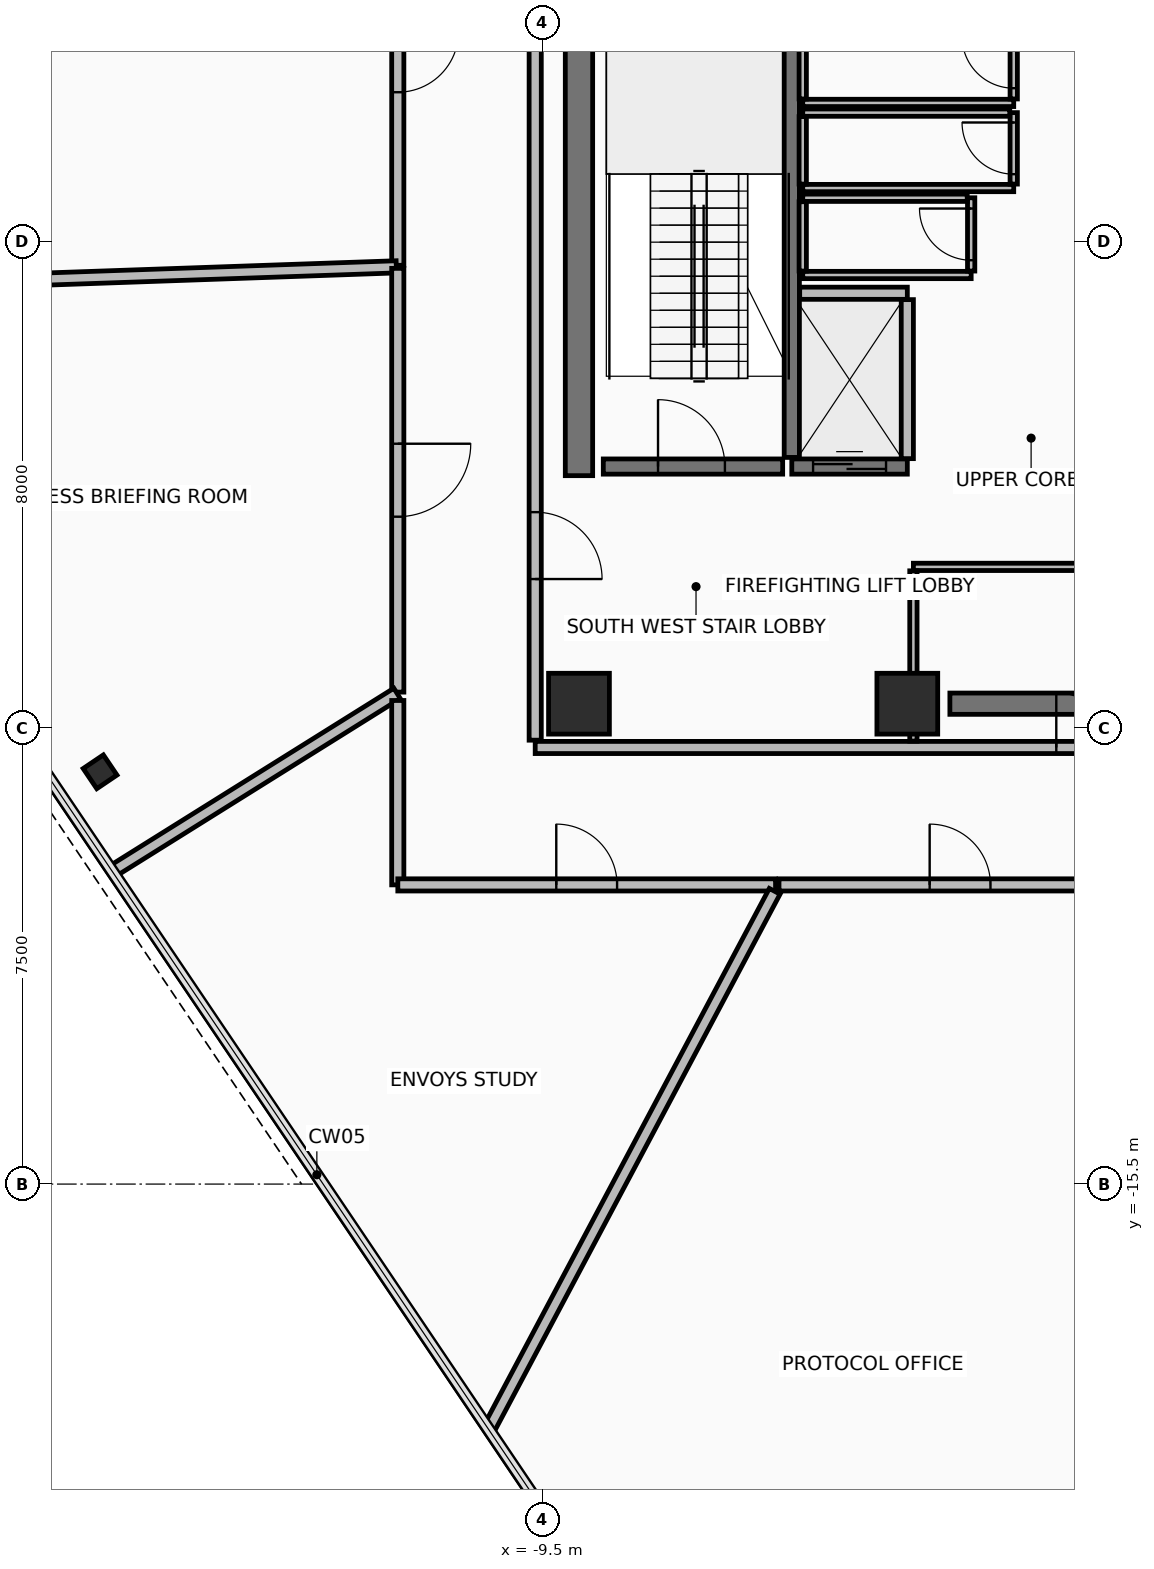
"""IFC4 building model, lengths in metres.
Left out: names, types, materials, properties, quantities, classifications, styles, units other than length and angle.
Written with IfcOpenShell. Run it as: python <this file> out.ifc"""

import sys

from ifc_helpers import new_model, si_unit, direction, frame, frame_2d, origin, origin_2d, place, context, subcontext, project, spatial, rectangle, hollow_rectangle, extrude, element, fill, save


model = new_model("IFC4")
c1 = context("Model", 3, precision=1e-05, world=origin(), true_north=direction((0.0, 1.0)))
c2 = subcontext(c1, "Body", "Model", "MODEL_VIEW")
j1 = project(units=[si_unit("LENGTHUNIT", "METRE"), si_unit("PLANEANGLEUNIT", "RADIAN")], contexts=[c1])
p1 = place(None, origin())
s1 = spatial("IfcSite", under=j1, at=p1, CompositionType="ELEMENT")
p2 = place(p1, origin())
s2 = spatial("IfcBuilding", under=s1, at=p2, CompositionType="ELEMENT")
p3 = place(p2, frame((0.0, 0.0, 275.0)))
s3 = spatial("IfcBuildingStorey", under=s2, at=p3, CompositionType="ELEMENT", Elevation=275.0)
for number, where, z_axis, x_axis in (
    (1, (-8.9, -7.6, 0.0), (0.0, 0.0, 1.0), (1.0, 0.0, 0.0)),
    (2, (-3.5, -7.6, 0.0), (0.0, 0.0, 1.0), (1.0, 0.0, 0.0)),
):
    element("IfcColumn", number, at=place(p3, frame(where, z_axis=z_axis, x_axis=x_axis)), inside=s3, PredefinedType="COLUMN", context=c2, shape_type="SweptSolid", body=[
        extrude(rectangle(XDim=1.0, YDim=1.0, at=origin_2d()), origin(), (0.0, 0.0, 1.0), 4.75),
    ])
p4 = place(p3, frame((-16.776, -8.72, 0.0), z_axis=(0.0, 0.0, 1.0), x_axis=(-0.559192903471, 0.829037572555, 0.0)))
e3 = element("IfcColumn", 3, at=p4, inside=s3, PredefinedType="COLUMN", context=c2, shape_type="SweptSolid", body=[
    extrude(hollow_rectangle(XDim=0.4, YDim=0.4, WallThickness=0.025, at=origin_2d()), origin(), (0.0, 0.0, 1.0), 4.75),
])
p5 = place(p3, frame((-2.8, -7.6, 0.0), z_axis=(0.0, 0.0, 1.0), x_axis=(1.0, 0.0, 0.0)))
e4 = element("IfcWall", 4, at=p5, inside=s3, PredefinedType="SHEAR", context=c2, shape_type="SweptSolid", body=[
    extrude(rectangle(XDim=5.38, YDim=0.35, at=frame_2d((2.69, 0.0))), origin(), (0.0, 0.0, 1.0), 4.56),
])
p6 = place(p3, frame((-8.9, -3.85, 0.0), z_axis=(0.0, 0.0, 1.0), x_axis=(0.0, 1.0, 0.0)))
e5 = element("IfcWall", 5, at=p6, inside=s3, PredefinedType="SHEAR", context=c2, shape_type="SweptSolid", body=[
    extrude(rectangle(XDim=10.7, YDim=0.45, at=frame_2d((5.35, 0.0))), origin(), (0.0, 0.0, 1.0), 4.56),
])
p7 = place(p3, frame((-9.62, -8.32, 0.0), z_axis=(0.0, 0.0, 1.0), x_axis=(1.0, 0.0, 0.0)))
e6 = element("IfcWall", 6, at=p7, inside=s3, PredefinedType="PARTITIONING", context=c2, shape_type="SweptSolid", body=[
    extrude(rectangle(XDim=19.24, YDim=0.2, at=frame_2d((9.62, 0.0))), origin(), (0.0, 0.0, 1.0), 2.355),
])
p8 = place(p7, frame((8.57, 0.0, 0.0)))
e7 = element("IfcOpeningElement", 7, at=p8, cuts=e6, PredefinedType="OPENING", context=c2, shape_type="SweptSolid", body=[
    extrude(rectangle(XDim=0.9, YDim=2.1, at=frame_2d((0.45, 1.05))), frame((0.0, 0.11, 0.0), z_axis=(0.0, -1.0, 0.0), x_axis=(1.0, 0.0, 0.0)), (0.0, 0.0, 1.0), 0.22),
])
p9 = place(p7, frame((15.02, 0.0, 0.0)))
e8 = element("IfcOpeningElement", 8, at=p9, cuts=e6, PredefinedType="OPENING", context=c2, shape_type="SweptSolid", body=[
    extrude(rectangle(XDim=0.9, YDim=2.1, at=frame_2d((0.45, 1.05))), frame((0.0, 0.11, 0.0), z_axis=(0.0, -1.0, 0.0), x_axis=(1.0, 0.0, 0.0)), (0.0, 0.0, 1.0), 0.22),
])
p10 = place(p3, frame((-9.62, 8.2, 0.0), z_axis=(0.0, 0.0, 1.0), x_axis=(0.0, -1.0, 0.0)))
e9 = element("IfcWall", 9, at=p10, inside=s3, PredefinedType="PARTITIONING", context=c2, shape_type="SweptSolid", body=[
    extrude(rectangle(XDim=16.4, YDim=0.2, at=frame_2d((8.2, 0.0))), origin(), (0.0, 0.0, 1.0), 2.355),
])
p11 = place(p10, frame((12.65, 0.0, 0.0)))
e10 = element("IfcOpeningElement", 10, at=p11, cuts=e9, PredefinedType="OPENING", context=c2, shape_type="SweptSolid", body=[
    extrude(rectangle(XDim=1.1, YDim=2.15, at=frame_2d((0.55, 1.075))), frame((0.0, 0.11, 0.0), z_axis=(0.0, -1.0, 0.0), x_axis=(1.0, 0.0, 0.0)), (0.0, 0.0, 1.0), 0.22),
])
p12 = place(p3, frame((-5.4, -3.55, 0.0), z_axis=(0.0, 0.0, 1.0), x_axis=(0.0, 1.0, 0.0)))
e11 = element("IfcWall", 11, at=p12, inside=s3, PredefinedType="SHEAR", context=c2, shape_type="SweptSolid", body=[
    extrude(rectangle(XDim=7.3, YDim=0.25, at=frame_2d((3.65, 0.0))), origin(), (0.0, 0.0, 1.0), 4.56),
])
p13 = place(p3, frame((-8.5, -3.7, 0.0), z_axis=(0.0, 0.0, 1.0), x_axis=(1.0, 0.0, 0.0)))
e12 = element("IfcWall", 12, at=p13, inside=s3, PredefinedType="SHEAR", context=c2, shape_type="SweptSolid", body=[
    extrude(rectangle(XDim=2.95, YDim=0.25, at=frame_2d((1.475, 0.0))), origin(), (0.0, 0.0, 1.0), 4.56),
])
p14 = place(p13, frame((0.9, 0.0, 0.0)))
e13 = element("IfcOpeningElement", 13, at=p14, cuts=e12, PredefinedType="OPENING", context=c2, shape_type="SweptSolid", body=[
    extrude(rectangle(XDim=1.1, YDim=2.15, at=frame_2d((0.55, 1.075))), frame((0.0, 0.135, 0.0), z_axis=(0.0, -1.0, 0.0), x_axis=(1.0, 0.0, 0.0)), (0.0, 0.0, 1.0), 0.27),
])
p15 = place(p3, frame((-5.4, -3.7, 0.0), z_axis=(0.0, 0.0, 1.0), x_axis=(1.0, 0.0, 0.0)))
e14 = element("IfcWall", 14, at=p15, inside=s3, PredefinedType="SHEAR", context=c2, shape_type="SweptSolid", body=[
    extrude(rectangle(XDim=1.9, YDim=0.25, at=frame_2d((0.95, 0.0))), origin(), (0.0, 0.0, 1.0), 4.56),
])
p16 = place(p15, frame((0.35, 0.0, 0.0)))
e15 = element("IfcOpeningElement", 15, at=p16, cuts=e14, PredefinedType="OPENING", context=c2, shape_type="SweptSolid", body=[
    extrude(rectangle(XDim=1.2, YDim=2.2, at=frame_2d((0.6, 1.1))), frame((0.0, 0.135, 0.0), z_axis=(0.0, -1.0, 0.0), x_axis=(1.0, 0.0, 0.0)), (0.0, 0.0, 1.0), 0.27),
])
p17 = place(p3, frame((-5.27, -0.85, 0.0), z_axis=(0.0, 0.0, 1.0), x_axis=(1.0, 0.0, 0.0)))
e16 = element("IfcWall", 16, at=p17, inside=s3, PredefinedType="PARTITIONING", context=c2, shape_type="SweptSolid", body=[
    extrude(rectangle(XDim=1.77, YDim=0.2, at=frame_2d((0.885, 0.0))), origin(), (0.0, 0.0, 1.0), 4.56),
])
p18 = place(p3, frame((-3.5, -3.57, 0.0), z_axis=(0.0, 0.0, 1.0), x_axis=(0.0, 1.0, 0.0)))
e17 = element("IfcWall", 17, at=p18, inside=s3, PredefinedType="PARTITIONING", context=c2, shape_type="SweptSolid", body=[
    extrude(rectangle(XDim=2.615, YDim=0.2, at=frame_2d((1.308, 0.0))), origin(), (0.0, 0.0, 1.0), 4.56),
])
p19 = place(p3, frame((-5.22, 2.28, 0.0), z_axis=(0.0, 0.0, 1.0), x_axis=(1.0, 0.0, 0.0)))
e18 = element("IfcWall", 18, at=p19, inside=s3, PredefinedType="PARTITIONING", context=c2, shape_type="SweptSolid", body=[
    extrude(rectangle(XDim=3.47, YDim=0.12, at=frame_2d((1.735, 0.0))), origin(), (0.0, 0.0, 1.0), 4.56),
])
p20 = place(p3, frame((-1.75, 2.345, 0.0), z_axis=(0.0, 0.0, 1.0), x_axis=(0.0, 1.0, 0.0)))
e19 = element("IfcWall", 19, at=p20, inside=s3, PredefinedType="PARTITIONING", context=c2, shape_type="SweptSolid", body=[
    extrude(rectangle(XDim=1.205, YDim=0.12, at=frame_2d((0.603, 0.0))), origin(), (0.0, 0.0, 1.0), 4.56),
])
p21 = place(p20, frame((0.177, 0.0, 0.0)))
e20 = element("IfcOpeningElement", 20, at=p21, cuts=e19, PredefinedType="OPENING", context=c2, shape_type="SweptSolid", body=[
    extrude(rectangle(XDim=0.85, YDim=2.1, at=frame_2d((0.425, 1.05))), frame((0.0, 0.07, 0.0), z_axis=(0.0, -1.0, 0.0), x_axis=(1.0, 0.0, 0.0)), (0.0, 0.0, 1.0), 0.14),
])
p22 = place(p3, frame((-5.22, 3.485, 0.0), z_axis=(0.0, 0.0, 1.0), x_axis=(0.0, -1.0, 0.0)))
e21 = element("IfcWall", 21, at=p22, inside=s3, PredefinedType="PARTITIONING", context=c2, shape_type="SweptSolid", body=[
    extrude(rectangle(XDim=1.14, YDim=0.12, at=frame_2d((0.57, 0.0))), origin(), (0.0, 0.0, 1.0), 4.56),
])
p23 = place(p3, frame((-5.22, 0.88, 0.0), z_axis=(0.0, 0.0, 1.0), x_axis=(1.0, 0.0, 0.0)))
e22 = element("IfcWall", 22, at=p23, inside=s3, PredefinedType="PARTITIONING", context=c2, shape_type="SweptSolid", body=[
    extrude(rectangle(XDim=3.47, YDim=0.12, at=frame_2d((1.735, 0.0))), origin(), (0.0, 0.0, 1.0), 4.56),
])
p24 = place(p3, frame((-1.75, 0.945, 0.0), z_axis=(0.0, 0.0, 1.0), x_axis=(0.0, 1.0, 0.0)))
e23 = element("IfcWall", 23, at=p24, inside=s3, PredefinedType="PARTITIONING", context=c2, shape_type="SweptSolid", body=[
    extrude(rectangle(XDim=1.175, YDim=0.12, at=frame_2d((0.587, 0.0))), origin(), (0.0, 0.0, 1.0), 4.56),
])
p25 = place(p24, frame((0.163, 0.0, 0.0)))
e24 = element("IfcOpeningElement", 24, at=p25, cuts=e23, PredefinedType="OPENING", context=c2, shape_type="SweptSolid", body=[
    extrude(rectangle(XDim=0.85, YDim=2.1, at=frame_2d((0.425, 1.05))), frame((0.0, 0.07, 0.0), z_axis=(0.0, -1.0, 0.0), x_axis=(1.0, 0.0, 0.0)), (0.0, 0.0, 1.0), 0.14),
])
p26 = place(p3, frame((-1.815, 2.12, 0.0), z_axis=(0.0, 0.0, 1.0), x_axis=(-1.0, 0.0, 0.0)))
e25 = element("IfcWall", 25, at=p26, inside=s3, PredefinedType="PARTITIONING", context=c2, shape_type="SweptSolid", body=[
    extrude(rectangle(XDim=3.405, YDim=0.12, at=frame_2d((1.703, 0.0))), origin(), (0.0, 0.0, 1.0), 4.56),
])
p27 = place(p3, frame((-5.22, 2.055, 0.0), z_axis=(0.0, 0.0, 1.0), x_axis=(0.0, -1.0, 0.0)))
e26 = element("IfcWall", 26, at=p27, inside=s3, PredefinedType="PARTITIONING", context=c2, shape_type="SweptSolid", body=[
    extrude(rectangle(XDim=1.11, YDim=0.12, at=frame_2d((0.555, 0.0))), origin(), (0.0, 0.0, 1.0), 4.56),
])
p28 = place(p3, frame((-5.22, -0.55, 0.0), z_axis=(0.0, 0.0, 1.0), x_axis=(1.0, 0.0, 0.0)))
e27 = element("IfcWall", 27, at=p28, inside=s3, PredefinedType="PARTITIONING", context=c2, shape_type="SweptSolid", body=[
    extrude(rectangle(XDim=2.77, YDim=0.12, at=frame_2d((1.385, 0.0))), origin(), (0.0, 0.0, 1.0), 4.56),
])
p29 = place(p3, frame((-2.45, -0.485, 0.0), z_axis=(0.0, 0.0, 1.0), x_axis=(0.0, 1.0, 0.0)))
e28 = element("IfcWall", 28, at=p29, inside=s3, PredefinedType="PARTITIONING", context=c2, shape_type="SweptSolid", body=[
    extrude(rectangle(XDim=1.205, YDim=0.12, at=frame_2d((0.603, 0.0))), origin(), (0.0, 0.0, 1.0), 4.56),
])
p30 = place(p29, frame((0.178, 0.0, 0.0)))
e29 = element("IfcOpeningElement", 29, at=p30, cuts=e28, PredefinedType="OPENING", context=c2, shape_type="SweptSolid", body=[
    extrude(rectangle(XDim=0.85, YDim=2.1, at=frame_2d((0.425, 1.05))), frame((0.0, 0.07, 0.0), z_axis=(0.0, -1.0, 0.0), x_axis=(1.0, 0.0, 0.0)), (0.0, 0.0, 1.0), 0.14),
])
p31 = place(p3, frame((-2.515, 0.72, 0.0), z_axis=(0.0, 0.0, 1.0), x_axis=(-1.0, 0.0, 0.0)))
e30 = element("IfcWall", 30, at=p31, inside=s3, PredefinedType="PARTITIONING", context=c2, shape_type="SweptSolid", body=[
    extrude(rectangle(XDim=2.705, YDim=0.12, at=frame_2d((1.353, 0.0))), origin(), (0.0, 0.0, 1.0), 4.56),
])
p32 = place(p3, frame((-5.22, 0.655, 0.0), z_axis=(0.0, 0.0, 1.0), x_axis=(0.0, -1.0, 0.0)))
e31 = element("IfcWall", 31, at=p32, inside=s3, PredefinedType="PARTITIONING", context=c2, shape_type="SweptSolid", body=[
    extrude(rectangle(XDim=1.14, YDim=0.12, at=frame_2d((0.57, 0.0))), origin(), (0.0, 0.0, 1.0), 4.56),
])
p33 = place(p3, frame((2.135, -5.35, 0.0), z_axis=(0.0, 0.0, 1.0), x_axis=(-1.0, 0.0, 0.0)))
e32 = element("IfcWall", 32, at=p33, inside=s3, PredefinedType="PARTITIONING", context=c2, shape_type="SweptSolid", body=[
    extrude(rectangle(XDim=5.535, YDim=0.12, at=frame_2d((2.768, 0.0))), origin(), (0.0, 0.0, 1.0), 3.855),
])
p34 = place(p3, frame((-3.4, -5.415, 0.0), z_axis=(0.0, 0.0, 1.0), x_axis=(0.0, -1.0, 0.0)))
e33 = element("IfcWall", 33, at=p34, inside=s3, PredefinedType="PARTITIONING", context=c2, shape_type="SweptSolid", body=[
    extrude(rectangle(XDim=2.8, YDim=0.12, at=frame_2d((1.4, 0.0))), origin(), (0.0, 0.0, 1.0), 2.355),
])
p35 = place(p3, frame((-11.88, 6.302, 0.0), z_axis=(0.0, 0.0, 1.0), x_axis=(0.0, -1.0, 0.0)))
e34 = element("IfcWall", 34, at=p35, inside=s3, PredefinedType="PARTITIONING", context=c2, shape_type="SweptSolid", body=[
    extrude(rectangle(XDim=6.692, YDim=0.2, at=frame_2d((3.346, 0.0))), origin(), (0.0, 0.0, 1.0), 2.355),
])
p36 = place(p35, frame((2.846, 0.0, 0.0)))
e35 = element("IfcOpeningElement", 35, at=p36, cuts=e34, PredefinedType="OPENING", context=c2, shape_type="SweptSolid", body=[
    extrude(rectangle(XDim=1.0, YDim=2.15, at=frame_2d((0.5, 1.075))), frame((0.0, 0.11, 0.0), z_axis=(0.0, -1.0, 0.0), x_axis=(1.0, 0.0, 0.0)), (0.0, 0.0, 1.0), 0.22),
])
p37 = place(p3, frame((-11.904, -0.416, 0.0), z_axis=(0.0, 0.0, 1.0), x_axis=(-0.999390843877, -0.034899013965, 0.0)))
e36 = element("IfcWall", 36, at=p37, inside=s3, PredefinedType="PARTITIONING", context=c2, shape_type="SweptSolid", body=[
    extrude(rectangle(XDim=11.109, YDim=0.2, at=frame_2d((5.555, 0.0))), origin(), (0.0, 0.0, 1.0), 2.255),
])
p38 = place(p3, frame((-11.88, -0.441, 0.0), z_axis=(0.0, 0.0, 1.0), x_axis=(0.0, -1.0, 0.0)))
e37 = element("IfcWall", 37, at=p38, inside=s3, PredefinedType="PARTITIONING", context=c2, shape_type="SweptSolid", body=[
    extrude(rectangle(XDim=6.969, YDim=0.2, at=frame_2d((3.484, 0.0))), origin(), (0.0, 0.0, 1.0), 4.56),
])
p39 = place(p38, frame((2.884, 0.0, 0.0)))
e38 = element("IfcOpeningElement", 38, at=p39, cuts=e37, PredefinedType="OPENING", context=c2, shape_type="SweptSolid", body=[
    extrude(rectangle(XDim=1.2, YDim=2.15, at=frame_2d((0.6, 1.075))), frame((0.0, 0.11, 0.0), z_axis=(0.0, -1.0, 0.0), x_axis=(1.0, 0.0, 0.0)), (0.0, 0.0, 1.0), 0.22),
])
p40 = place(p3, frame((-11.892, -7.431, 0.0), z_axis=(0.0, 0.0, 1.0), x_axis=(-0.848053170971, -0.529911142745, 0.0)))
e39 = element("IfcWall", 39, at=p40, inside=s3, PredefinedType="PARTITIONING", context=c2, shape_type="SweptSolid", body=[
    extrude(rectangle(XDim=5.499, YDim=0.2, at=frame_2d((2.75, 0.0))), origin(), (0.0, 0.0, 1.0), 2.255),
])
p41 = place(p3, frame((-11.88, -7.547, 0.0), z_axis=(0.0, 0.0, 1.0), x_axis=(0.0, -1.0, 0.0)))
e40 = element("IfcWall", 40, at=p41, inside=s3, PredefinedType="PARTITIONING", context=c2, shape_type="SweptSolid", body=[
    extrude(rectangle(XDim=3.032, YDim=0.2, at=frame_2d((1.516, 0.0))), origin(), (0.0, 0.0, 1.0), 2.755),
])
p42 = place(p3, frame((-11.879, -10.58, 0.0), z_axis=(0.0, 0.0, 1.0), x_axis=(1.0, 0.0, 0.0)))
e41 = element("IfcWall", 41, at=p42, inside=s3, PredefinedType="PARTITIONING", context=c2, shape_type="SweptSolid", body=[
    extrude(rectangle(XDim=6.212, YDim=0.2, at=frame_2d((3.106, 0.0))), origin(), (0.0, 0.0, 1.0), 4.315),
])
p43 = place(p42, frame((2.606, 0.0, 0.0)))
e42 = element("IfcOpeningElement", 42, at=p43, cuts=e41, PredefinedType="OPENING", context=c2, shape_type="SweptSolid", body=[
    extrude(rectangle(XDim=1.0, YDim=2.15, at=frame_2d((0.5, 1.075))), frame((0.0, 0.11, 0.0), z_axis=(0.0, -1.0, 0.0), x_axis=(1.0, 0.0, 0.0)), (0.0, 0.0, 1.0), 0.22),
])
p44 = place(p3, frame((-5.681, -10.685, 0.0), z_axis=(0.0, 0.0, 1.0), x_axis=(-0.469465104715, -0.882951026646, 0.0)))
e43 = element("IfcWall", 43, at=p44, inside=s3, PredefinedType="PARTITIONING", context=c2, shape_type="SweptSolid", body=[
    extrude(rectangle(XDim=10.022, YDim=0.2, at=frame_2d((5.011, 0.0))), origin(), (0.0, 0.0, 1.0), 2.255),
])
p45 = place(p3, frame((-5.611, -10.58, 0.0), z_axis=(0.0, 0.0, 1.0), x_axis=(1.0, 0.0, 0.0)))
e44 = element("IfcWall", 44, at=p45, inside=s3, PredefinedType="PARTITIONING", context=c2, shape_type="SweptSolid", body=[
    extrude(rectangle(XDim=5.956, YDim=0.2, at=frame_2d((2.978, 0.0))), origin(), (0.0, 0.0, 1.0), 2.355),
])
p46 = place(p45, frame((2.478, 0.0, 0.0)))
e45 = element("IfcOpeningElement", 45, at=p46, cuts=e44, PredefinedType="OPENING", context=c2, shape_type="SweptSolid", body=[
    extrude(rectangle(XDim=1.0, YDim=2.15, at=frame_2d((0.5, 1.075))), frame((0.0, 0.11, 0.0), z_axis=(0.0, -1.0, 0.0), x_axis=(1.0, 0.0, 0.0)), (0.0, 0.0, 1.0), 0.22),
])
p47 = place(p11, frame((1.1, 0.0, 0.0), z_axis=(0.0, 0.0, 1.0), x_axis=(-1.0, 0.0, 0.0)))
e46 = element("IfcDoor", 46, at=p47, inside=s3, OperationType="SINGLE_SWING_LEFT", PredefinedType="DOOR", context=c2, shape_type="SweptSolid", body=[
    extrude(rectangle(XDim=1.1, YDim=2.15, at=frame_2d((0.55, 1.075))), frame((0.0, 0.025, 0.0), z_axis=(0.0, -1.0, 0.0), x_axis=(1.0, 0.0, 0.0)), (0.0, 0.0, 1.0), 0.05),
])
fill(e10, e46)
p48 = place(p14, origin())
e47 = element("IfcDoor", 47, at=p48, inside=s3, OperationType="SINGLE_SWING_LEFT", PredefinedType="DOOR", context=c2, shape_type="SweptSolid", body=[
    extrude(rectangle(XDim=1.1, YDim=2.15, at=frame_2d((0.55, 1.075))), frame((0.0, 0.025, 0.0), z_axis=(0.0, -1.0, 0.0), x_axis=(1.0, 0.0, 0.0)), (0.0, 0.0, 1.0), 0.05),
])
fill(e13, e47)
p49 = place(p16, origin())
e48 = element("IfcDoor", 48, at=p49, inside=s3, OperationType="SLIDING_TO_RIGHT", PredefinedType="DOOR", context=c2, shape_type="SweptSolid", body=[
    extrude(rectangle(XDim=1.2, YDim=2.2, at=frame_2d((0.6, 1.1))), frame((0.0, 0.025, 0.0), z_axis=(0.0, -1.0, 0.0), x_axis=(1.0, 0.0, 0.0)), (0.0, 0.0, 1.0), 0.05),
])
fill(e15, e48)
p50 = place(p21, frame((0.85, 0.0, 0.0), z_axis=(0.0, 0.0, 1.0), x_axis=(-1.0, 0.0, 0.0)))
e49 = element("IfcDoor", 49, at=p50, inside=s3, OperationType="SINGLE_SWING_RIGHT", PredefinedType="DOOR", context=c2, shape_type="SweptSolid", body=[
    extrude(rectangle(XDim=0.85, YDim=2.1, at=frame_2d((0.425, 1.05))), frame((0.0, 0.025, 0.0), z_axis=(0.0, -1.0, 0.0), x_axis=(1.0, 0.0, 0.0)), (0.0, 0.0, 1.0), 0.05),
])
fill(e20, e49)
p51 = place(p25, frame((0.85, 0.0, 0.0), z_axis=(0.0, 0.0, 1.0), x_axis=(-1.0, 0.0, 0.0)))
e50 = element("IfcDoor", 50, at=p51, inside=s3, OperationType="SINGLE_SWING_RIGHT", PredefinedType="DOOR", context=c2, shape_type="SweptSolid", body=[
    extrude(rectangle(XDim=0.85, YDim=2.1, at=frame_2d((0.425, 1.05))), frame((0.0, 0.025, 0.0), z_axis=(0.0, -1.0, 0.0), x_axis=(1.0, 0.0, 0.0)), (0.0, 0.0, 1.0), 0.05),
])
fill(e24, e50)
p52 = place(p30, frame((0.85, 0.0, 0.0), z_axis=(0.0, 0.0, 1.0), x_axis=(-1.0, 0.0, 0.0)))
e51 = element("IfcDoor", 51, at=p52, inside=s3, OperationType="SINGLE_SWING_RIGHT", PredefinedType="DOOR", context=c2, shape_type="SweptSolid", body=[
    extrude(rectangle(XDim=0.85, YDim=2.1, at=frame_2d((0.425, 1.05))), frame((0.0, 0.025, 0.0), z_axis=(0.0, -1.0, 0.0), x_axis=(1.0, 0.0, 0.0)), (0.0, 0.0, 1.0), 0.05),
])
fill(e29, e51)
p53 = place(p8, origin())
e52 = element("IfcDoor", 52, at=p53, inside=s3, OperationType="SINGLE_SWING_LEFT", PredefinedType="DOOR", context=c2, shape_type="SweptSolid", body=[
    extrude(rectangle(XDim=0.9, YDim=2.1, at=frame_2d((0.45, 1.05))), frame((0.0, 0.025, 0.0), z_axis=(0.0, -1.0, 0.0), x_axis=(1.0, 0.0, 0.0)), (0.0, 0.0, 1.0), 0.05),
])
fill(e7, e52)
p54 = place(p36, origin())
e53 = element("IfcDoor", 53, at=p54, inside=s3, OperationType="SINGLE_SWING_RIGHT", PredefinedType="DOOR", context=c2, shape_type="SweptSolid", body=[
    extrude(rectangle(XDim=1.0, YDim=2.15, at=frame_2d((0.5, 1.075))), frame((0.0, 0.025, 0.0), z_axis=(0.0, -1.0, 0.0), x_axis=(1.0, 0.0, 0.0)), (0.0, 0.0, 1.0), 0.05),
])
fill(e35, e53)
p55 = place(p39, origin())
e54 = element("IfcDoor", 54, at=p55, inside=s3, OperationType="SINGLE_SWING_LEFT", PredefinedType="DOOR", context=c2, shape_type="SweptSolid", body=[
    extrude(rectangle(XDim=1.2, YDim=2.15, at=frame_2d((0.6, 1.075))), frame((0.0, 0.025, 0.0), z_axis=(0.0, -1.0, 0.0), x_axis=(1.0, 0.0, 0.0)), (0.0, 0.0, 1.0), 0.05),
])
fill(e38, e54)
p56 = place(p43, origin())
e55 = element("IfcDoor", 55, at=p56, inside=s3, OperationType="SINGLE_SWING_RIGHT", PredefinedType="DOOR", context=c2, shape_type="SweptSolid", body=[
    extrude(rectangle(XDim=1.0, YDim=2.15, at=frame_2d((0.5, 1.075))), frame((0.0, 0.025, 0.0), z_axis=(0.0, -1.0, 0.0), x_axis=(1.0, 0.0, 0.0)), (0.0, 0.0, 1.0), 0.05),
])
fill(e42, e55)
p57 = place(p46, origin())
e56 = element("IfcDoor", 56, at=p57, inside=s3, OperationType="SINGLE_SWING_RIGHT", PredefinedType="DOOR", context=c2, shape_type="SweptSolid", body=[
    extrude(rectangle(XDim=1.0, YDim=2.15, at=frame_2d((0.5, 1.075))), frame((0.0, 0.025, 0.0), z_axis=(0.0, -1.0, 0.0), x_axis=(1.0, 0.0, 0.0)), (0.0, 0.0, 1.0), 0.05),
])
fill(e45, e56)
save(model, sys.argv[1])
